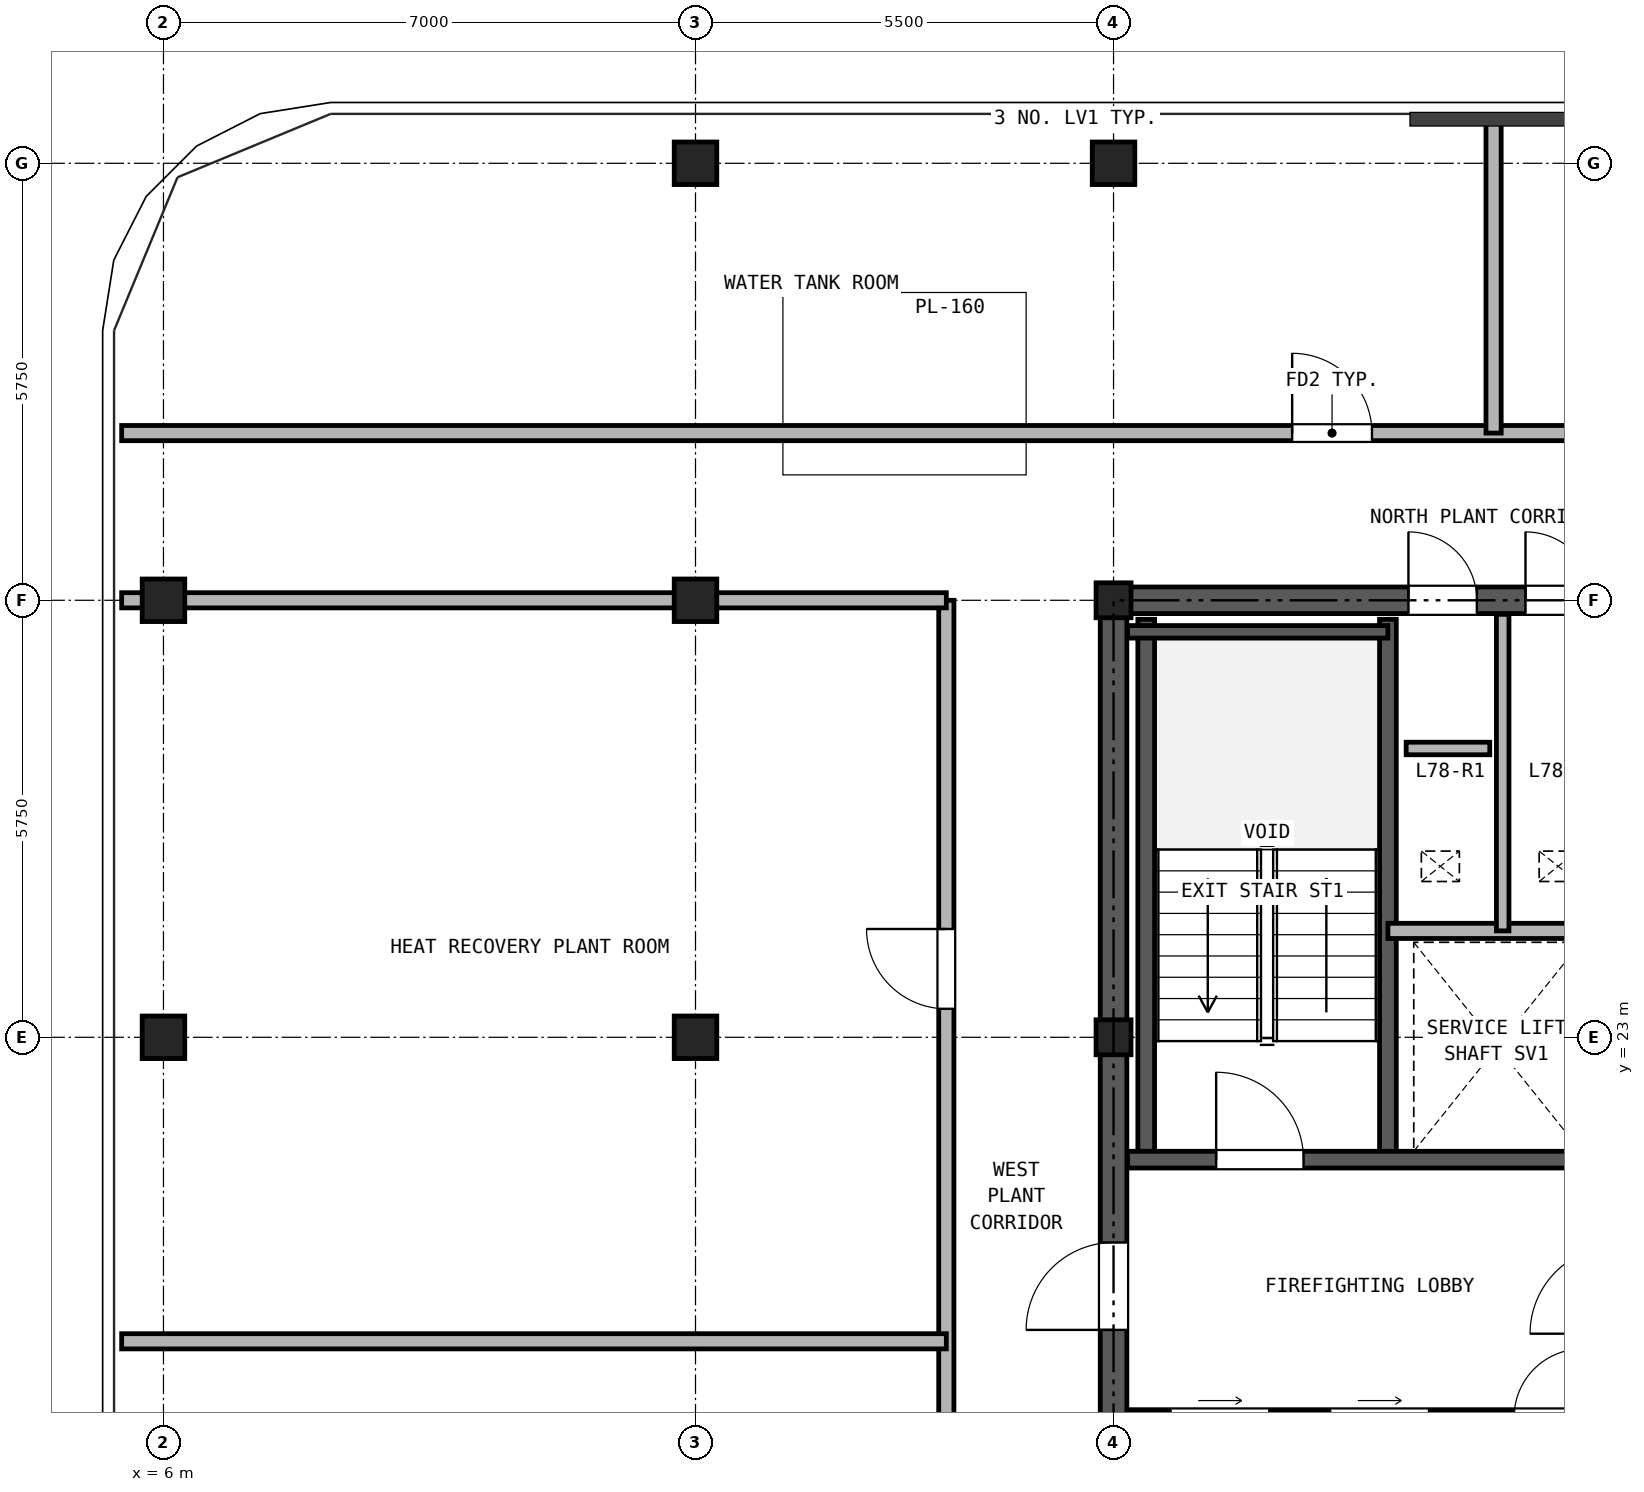
"""IFC4 building model, lengths in metres.
Left out: names, types, materials, properties, quantities, classifications, styles, units other than length and angle.
Written with IfcOpenShell. Run it as: python <this file> out.ifc"""

import sys

from ifc_helpers import new_model, si_unit, direction, frame, frame_2d, origin, origin_2d, place, context, subcontext, project, spatial, rectangle, hollow_rectangle, extrude, source, transform, mapped, element, fill, save


model = new_model("IFC4")
c1 = context("Model", 3, precision=1e-05, world=origin(), true_north=direction((0.0, 1.0)))
c2 = subcontext(c1, "Body", "Model", "MODEL_VIEW")
j1 = project(units=[si_unit("LENGTHUNIT", "METRE"), si_unit("PLANEANGLEUNIT", "RADIAN")], contexts=[c1])
p1 = place(None, origin())
s1 = spatial("IfcSite", under=j1, at=p1, CompositionType="ELEMENT")
p2 = place(p1, origin())
s2 = spatial("IfcBuilding", under=s1, at=p2, CompositionType="ELEMENT")
p3 = place(p2, frame((0.0, 0.0, 271.3)))
s3 = spatial("IfcBuildingStorey", under=s2, at=p3, CompositionType="ELEMENT", Elevation=271.3)
m1 = source(origin(), c2, "Body", "SweptSolid", [
    extrude(hollow_rectangle(XDim=0.56, YDim=0.56, WallThickness=0.03, at=origin_2d()), origin(), (0.0, 0.0, 1.0), 3.38),
])
for number, where, z_axis, x_axis in (
    (1, (13.0, 34.5, 0.0), (0.0, 0.0, 1.0), (1.0, 0.0, 0.0)),
    (2, (18.5, 34.5, 0.0), (0.0, 0.0, 1.0), (1.0, 0.0, 0.0)),
    (3, (6.0, 23.0, 0.0), (0.0, 0.0, 1.0), (1.0, 0.0, 0.0)),
    (4, (6.0, 28.75, 0.0), (0.0, 0.0, 1.0), (1.0, 0.0, 0.0)),
    (5, (13.0, 23.0, 0.0), (0.0, 0.0, 1.0), (1.0, 0.0, 0.0)),
    (6, (13.0, 28.75, 0.0), (0.0, 0.0, 1.0), (1.0, 0.0, 0.0)),
):
    element("IfcColumn", number, at=place(p3, frame(where, z_axis=z_axis, x_axis=x_axis)), inside=s3, PredefinedType="COLUMN", context=c2, shape_type="MappedRepresentation", body=[
        mapped(m1, transform((0.0, 0.0, 0.0), x_axis=(1.0, 0.0, 0.0), y_axis=(0.0, 1.0, 0.0), z_axis=(0.0, 0.0, 1.0), scale=1.0)),
    ])
m2 = source(origin(), c2, "Body", "SweptSolid", [
    extrude(hollow_rectangle(XDim=0.46, YDim=0.46, WallThickness=0.025, at=origin_2d()), origin(), (0.0, 0.0, 1.0), 3.38),
])
for number, where, z_axis, x_axis in (
    (7, (18.5, 23.0, 0.0), (0.0, 0.0, 1.0), (1.0, 0.0, 0.0)),
    (8, (18.5, 28.75, 0.0), (0.0, 0.0, 1.0), (1.0, 0.0, 0.0)),
):
    element("IfcColumn", number, at=place(p3, frame(where, z_axis=z_axis, x_axis=x_axis)), inside=s3, PredefinedType="COLUMN", context=c2, shape_type="MappedRepresentation", body=[
        mapped(m2, transform((0.0, 0.0, 0.0), x_axis=(1.0, 0.0, 0.0), y_axis=(0.0, 1.0, 0.0), z_axis=(0.0, 0.0, 1.0), scale=1.0)),
    ])
p4 = place(p3, frame((18.325, 28.75, 0.0), z_axis=(0.0, 0.0, 1.0), x_axis=(1.0, 0.0, 0.0)))
e9 = element("IfcWall", 9, at=p4, inside=s3, PredefinedType="SHEAR", context=c2, shape_type="SweptSolid", body=[
    extrude(rectangle(XDim=10.35, YDim=0.35, at=frame_2d((5.175, 0.0))), origin(), (0.0, 0.0, 1.0), 3.38),
])
p5 = place(p4, frame((4.055, 0.0, 0.0)))
e10 = element("IfcOpeningElement", 10, at=p5, cuts=e9, PredefinedType="OPENING", context=c2, shape_type="SweptSolid", body=[
    extrude(rectangle(XDim=0.9, YDim=2.05, at=frame_2d((0.45, 1.025))), frame((0.0, 0.185, 0.0), z_axis=(0.0, -1.0, 0.0), x_axis=(1.0, 0.0, 0.0)), (0.0, 0.0, 1.0), 0.37),
])
p6 = place(p4, frame((5.595, 0.0, 0.0)))
e11 = element("IfcOpeningElement", 11, at=p6, cuts=e9, PredefinedType="OPENING", context=c2, shape_type="SweptSolid", body=[
    extrude(rectangle(XDim=0.9, YDim=2.05, at=frame_2d((0.45, 1.025))), frame((0.0, 0.185, 0.0), z_axis=(0.0, -1.0, 0.0), x_axis=(1.0, 0.0, 0.0)), (0.0, 0.0, 1.0), 0.37),
])
p7 = place(p3, frame((18.5, 11.675, 0.0), z_axis=(0.0, 0.0, 1.0), x_axis=(0.0, 1.0, 0.0)))
e12 = element("IfcWall", 12, at=p7, inside=s3, PredefinedType="SHEAR", context=c2, shape_type="SweptSolid", body=[
    extrude(rectangle(XDim=16.9, YDim=0.35, at=frame_2d((8.45, 0.0))), origin(), (0.0, 0.0, 1.0), 3.38),
])
p8 = place(p7, frame((7.475, 0.0, 0.0)))
e13 = element("IfcOpeningElement", 13, at=p8, cuts=e12, PredefinedType="OPENING", context=c2, shape_type="SweptSolid", body=[
    extrude(rectangle(XDim=1.15, YDim=2.2, at=frame_2d((0.575, 1.1))), frame((0.0, 0.185, 0.0), z_axis=(0.0, -1.0, 0.0), x_axis=(1.0, 0.0, 0.0)), (0.0, 0.0, 1.0), 0.37),
])
for number, where, z_axis, x_axis in (
    (14, (18.93, 21.39, 0.0), (0.0, 0.0, 1.0), (0.0, 1.0, 0.0)),
    (15, (22.11, 21.39, 0.0), (0.0, 0.0, 1.0), (0.0, 1.0, 0.0)),
):
    element("IfcWall", number, at=place(p3, frame(where, z_axis=z_axis, x_axis=x_axis)), inside=s3, PredefinedType="SOLIDWALL", context=c2, shape_type="SweptSolid", body=[
        extrude(rectangle(XDim=7.11, YDim=0.22, at=frame_2d((3.555, 0.0))), origin(), (0.0, 0.0, 1.0), 3.38),
    ])
p9 = place(p3, frame((18.685, 28.335, 0.0), z_axis=(0.0, 0.0, 1.0), x_axis=(1.0, 0.0, 0.0)))
e16 = element("IfcWall", 16, at=p9, inside=s3, PredefinedType="PARTITIONING", context=c2, shape_type="SweptSolid", body=[
    extrude(rectangle(XDim=3.425, YDim=0.165, at=frame_2d((1.712, 0.0))), origin(), (0.0, 0.0, 1.0), 3.38),
])
p10 = place(p3, frame((18.685, 21.39, 0.0), z_axis=(0.0, 0.0, 1.0), x_axis=(1.0, 0.0, 0.0)))
e17 = element("IfcWall", 17, at=p10, inside=s3, PredefinedType="SOLIDWALL", context=c2, shape_type="SweptSolid", body=[
    extrude(rectangle(XDim=6.445, YDim=0.22, at=frame_2d((3.222, 0.0))), origin(), (0.0, 0.0, 1.0), 3.38),
])
p11 = place(p10, frame((1.165, 0.0, 0.0)))
e18 = element("IfcOpeningElement", 18, at=p11, cuts=e17, PredefinedType="OPENING", context=c2, shape_type="SweptSolid", body=[
    extrude(rectangle(XDim=1.15, YDim=2.2, at=frame_2d((0.575, 1.1))), frame((0.0, 0.12, 0.0), z_axis=(0.0, -1.0, 0.0), x_axis=(1.0, 0.0, 0.0)), (0.0, 0.0, 1.0), 0.24),
])
p12 = place(p3, frame((22.11, 24.4, 0.0), z_axis=(0.0, 0.0, 1.0), x_axis=(1.0, 0.0, 0.0)))
e19 = element("IfcWall", 19, at=p12, inside=s3, PredefinedType="PARTITIONING", context=c2, shape_type="SweptSolid", body=[
    extrude(rectangle(XDim=3.02, YDim=0.2, at=frame_2d((1.51, 0.0))), origin(), (0.0, 0.0, 1.0), 3.38),
])
p13 = place(p3, frame((23.62, 24.4, 0.0), z_axis=(0.0, 0.0, 1.0), x_axis=(0.0, 1.0, 0.0)))
e20 = element("IfcWall", 20, at=p13, inside=s3, PredefinedType="PARTITIONING", context=c2, shape_type="SweptSolid", body=[
    extrude(rectangle(XDim=4.165, YDim=0.165, at=frame_2d((2.083, 0.0))), origin(), (0.0, 0.0, 1.0), 3.38),
])
p14 = place(p3, frame((18.685, 18.0, 0.0), z_axis=(0.0, 0.0, 1.0), x_axis=(1.0, 0.0, 0.0)))
e21 = element("IfcWall", 21, at=p14, inside=s3, PredefinedType="PARTITIONING", context=c2, shape_type="SweptSolid", body=[
    extrude(rectangle(XDim=9.63, YDim=0.2, at=frame_2d((4.815, 0.0))), origin(), (0.0, 0.0, 1.0), 3.38),
])
p15 = place(p14, frame((0.565, 0.0, 0.0)))
e22 = element("IfcOpeningElement", 22, at=p15, cuts=e21, PredefinedType="OPENING", context=c2, shape_type="SweptSolid", body=[
    extrude(rectangle(XDim=1.3, YDim=2.3, at=frame_2d((0.65, 1.15))), frame((0.0, 0.11, 0.0), z_axis=(0.0, -1.0, 0.0), x_axis=(1.0, 0.0, 0.0)), (0.0, 0.0, 1.0), 0.22),
])
p16 = place(p14, frame((2.665, 0.0, 0.0)))
e23 = element("IfcOpeningElement", 23, at=p16, cuts=e21, PredefinedType="OPENING", context=c2, shape_type="SweptSolid", body=[
    extrude(rectangle(XDim=1.3, YDim=2.3, at=frame_2d((0.65, 1.15))), frame((0.0, 0.11, 0.0), z_axis=(0.0, -1.0, 0.0), x_axis=(1.0, 0.0, 0.0)), (0.0, 0.0, 1.0), 0.22),
])
p17 = place(p14, frame((5.085, 0.0, 0.0)))
e24 = element("IfcOpeningElement", 24, at=p17, cuts=e21, PredefinedType="OPENING", context=c2, shape_type="SweptSolid", body=[
    extrude(rectangle(XDim=0.9, YDim=2.05, at=frame_2d((0.45, 1.025))), frame((0.0, 0.11, 0.0), z_axis=(0.0, -1.0, 0.0), x_axis=(1.0, 0.0, 0.0)), (0.0, 0.0, 1.0), 0.22),
])
p18 = place(p14, frame((8.215, 0.0, 0.0)))
e25 = element("IfcOpeningElement", 25, at=p18, cuts=e21, PredefinedType="OPENING", context=c2, shape_type="SweptSolid", body=[
    extrude(rectangle(XDim=0.9, YDim=2.05, at=frame_2d((0.45, 1.025))), frame((0.0, 0.11, 0.0), z_axis=(0.0, -1.0, 0.0), x_axis=(1.0, 0.0, 0.0)), (0.0, 0.0, 1.0), 0.22),
])
p19 = place(p3, frame((5.45, 30.95, 0.0), z_axis=(0.0, 0.0, 1.0), x_axis=(1.0, 0.0, 0.0)))
e26 = element("IfcWall", 26, at=p19, inside=s3, PredefinedType="PARTITIONING", context=c2, shape_type="SweptSolid", body=[
    extrude(rectangle(XDim=36.1, YDim=0.2, at=frame_2d((18.05, 0.0))), origin(), (0.0, 0.0, 1.0), 3.38),
])
p20 = place(p19, frame((15.4, 0.0, 0.0)))
e27 = element("IfcOpeningElement", 27, at=p20, cuts=e26, PredefinedType="OPENING", context=c2, shape_type="SweptSolid", body=[
    extrude(rectangle(XDim=1.05, YDim=2.15, at=frame_2d((0.525, 1.075))), frame((0.0, 0.11, 0.0), z_axis=(0.0, -1.0, 0.0), x_axis=(1.0, 0.0, 0.0)), (0.0, 0.0, 1.0), 0.22),
])
p21 = place(p19, frame((19.7, 0.0, 0.0)))
e28 = element("IfcOpeningElement", 28, at=p21, cuts=e26, PredefinedType="OPENING", context=c2, shape_type="SweptSolid", body=[
    extrude(rectangle(XDim=1.05, YDim=2.15, at=frame_2d((0.525, 1.075))), frame((0.0, 0.11, 0.0), z_axis=(0.0, -1.0, 0.0), x_axis=(1.0, 0.0, 0.0)), (0.0, 0.0, 1.0), 0.22),
])
p22 = place(p3, frame((16.3, 8.9, 0.0), z_axis=(0.0, 0.0, 1.0), x_axis=(0.0, 1.0, 0.0)))
e29 = element("IfcWall", 29, at=p22, inside=s3, PredefinedType="PARTITIONING", context=c2, shape_type="SweptSolid", body=[
    extrude(rectangle(XDim=19.85, YDim=0.2, at=frame_2d((9.925, 0.0))), origin(), (0.0, 0.0, 1.0), 3.38),
])
p23 = place(p22, frame((4.55, 0.0, 0.0)))
e30 = element("IfcOpeningElement", 30, at=p23, cuts=e29, PredefinedType="OPENING", context=c2, shape_type="SweptSolid", body=[
    extrude(rectangle(XDim=1.05, YDim=2.15, at=frame_2d((0.525, 1.075))), frame((0.0, 0.11, 0.0), z_axis=(0.0, -1.0, 0.0), x_axis=(1.0, 0.0, 0.0)), (0.0, 0.0, 1.0), 0.22),
])
p24 = place(p22, frame((14.475, 0.0, 0.0)))
e31 = element("IfcOpeningElement", 31, at=p24, cuts=e29, PredefinedType="OPENING", context=c2, shape_type="SweptSolid", body=[
    extrude(rectangle(XDim=1.05, YDim=2.15, at=frame_2d((0.525, 1.075))), frame((0.0, 0.11, 0.0), z_axis=(0.0, -1.0, 0.0), x_axis=(1.0, 0.0, 0.0)), (0.0, 0.0, 1.0), 0.22),
])
p25 = place(p3, frame((5.45, 28.75, 0.0), z_axis=(0.0, 0.0, 1.0), x_axis=(1.0, 0.0, 0.0)))
e32 = element("IfcWall", 32, at=p25, inside=s3, PredefinedType="PARTITIONING", context=c2, shape_type="SweptSolid", body=[
    extrude(rectangle(XDim=10.85, YDim=0.2, at=frame_2d((5.425, 0.0))), origin(), (0.0, 0.0, 1.0), 2.905),
])
p26 = place(p3, frame((23.5, 30.95, 0.0), z_axis=(0.0, 0.0, 1.0), x_axis=(0.0, 1.0, 0.0)))
e33 = element("IfcWall", 33, at=p26, inside=s3, PredefinedType="PARTITIONING", context=c2, shape_type="SweptSolid", body=[
    extrude(rectangle(XDim=4.1, YDim=0.2, at=frame_2d((2.05, 0.0))), origin(), (0.0, 0.0, 1.0), 3.38),
])
p27 = place(p3, frame((5.45, 19.0, 0.0), z_axis=(0.0, 0.0, 1.0), x_axis=(1.0, 0.0, 0.0)))
e34 = element("IfcWall", 34, at=p27, inside=s3, PredefinedType="PARTITIONING", context=c2, shape_type="SweptSolid", body=[
    extrude(rectangle(XDim=10.85, YDim=0.2, at=frame_2d((5.425, 0.0))), origin(), (0.0, 0.0, 1.0), 3.38),
])
p28 = place(p3, frame((22.35, 26.8, 0.0), z_axis=(0.0, 0.0, 1.0), x_axis=(1.0, 0.0, 0.0)))
e35 = element("IfcWall", 35, at=p28, inside=s3, PredefinedType="PARTITIONING", context=c2, shape_type="SweptSolid", body=[
    extrude(rectangle(XDim=1.1, YDim=0.165, at=frame_2d((0.55, 0.0))), origin(), (0.0, 0.0, 1.0), 3.38),
])
p29 = place(p11, frame((1.15, 0.0, 0.0), z_axis=(0.0, 0.0, 1.0), x_axis=(-1.0, 0.0, 0.0)))
e36 = element("IfcDoor", 36, at=p29, inside=s3, OperationType="SINGLE_SWING_LEFT", PredefinedType="DOOR", context=c2, shape_type="SweptSolid", body=[
    extrude(rectangle(XDim=1.15, YDim=2.2, at=frame_2d((0.575, 1.1))), frame((0.0, 0.025, 0.0), z_axis=(0.0, -1.0, 0.0), x_axis=(1.0, 0.0, 0.0)), (0.0, 0.0, 1.0), 0.05),
])
fill(e18, e36)
p30 = place(p8, frame((1.15, 0.0, 0.0), z_axis=(0.0, 0.0, 1.0), x_axis=(-1.0, 0.0, 0.0)))
e37 = element("IfcDoor", 37, at=p30, inside=s3, OperationType="SINGLE_SWING_LEFT", PredefinedType="DOOR", context=c2, shape_type="SweptSolid", body=[
    extrude(rectangle(XDim=1.15, YDim=2.2, at=frame_2d((0.575, 1.1))), frame((0.0, 0.025, 0.0), z_axis=(0.0, -1.0, 0.0), x_axis=(1.0, 0.0, 0.0)), (0.0, 0.0, 1.0), 0.05),
])
fill(e13, e37)
p31 = place(p5, origin())
e38 = element("IfcDoor", 38, at=p31, inside=s3, OperationType="SINGLE_SWING_LEFT", PredefinedType="DOOR", context=c2, shape_type="SweptSolid", body=[
    extrude(rectangle(XDim=0.9, YDim=2.05, at=frame_2d((0.45, 1.025))), frame((0.0, 0.025, 0.0), z_axis=(0.0, -1.0, 0.0), x_axis=(1.0, 0.0, 0.0)), (0.0, 0.0, 1.0), 0.05),
])
fill(e10, e38)
p32 = place(p6, origin())
e39 = element("IfcDoor", 39, at=p32, inside=s3, OperationType="SINGLE_SWING_LEFT", PredefinedType="DOOR", context=c2, shape_type="SweptSolid", body=[
    extrude(rectangle(XDim=0.9, YDim=2.05, at=frame_2d((0.45, 1.025))), frame((0.0, 0.025, 0.0), z_axis=(0.0, -1.0, 0.0), x_axis=(1.0, 0.0, 0.0)), (0.0, 0.0, 1.0), 0.05),
])
fill(e11, e39)
p33 = place(p20, origin())
e40 = element("IfcDoor", 40, at=p33, inside=s3, OperationType="SINGLE_SWING_LEFT", PredefinedType="DOOR", context=c2, shape_type="SweptSolid", body=[
    extrude(rectangle(XDim=1.05, YDim=2.15, at=frame_2d((0.525, 1.075))), frame((0.0, 0.025, 0.0), z_axis=(0.0, -1.0, 0.0), x_axis=(1.0, 0.0, 0.0)), (0.0, 0.0, 1.0), 0.05),
])
fill(e27, e40)
p34 = place(p24, frame((1.05, 0.0, 0.0), z_axis=(0.0, 0.0, 1.0), x_axis=(-1.0, 0.0, 0.0)))
e41 = element("IfcDoor", 41, at=p34, inside=s3, OperationType="SINGLE_SWING_RIGHT", PredefinedType="DOOR", context=c2, shape_type="SweptSolid", body=[
    extrude(rectangle(XDim=1.05, YDim=2.15, at=frame_2d((0.525, 1.075))), frame((0.0, 0.025, 0.0), z_axis=(0.0, -1.0, 0.0), x_axis=(1.0, 0.0, 0.0)), (0.0, 0.0, 1.0), 0.05),
])
fill(e31, e41)
save(model, sys.argv[1])
